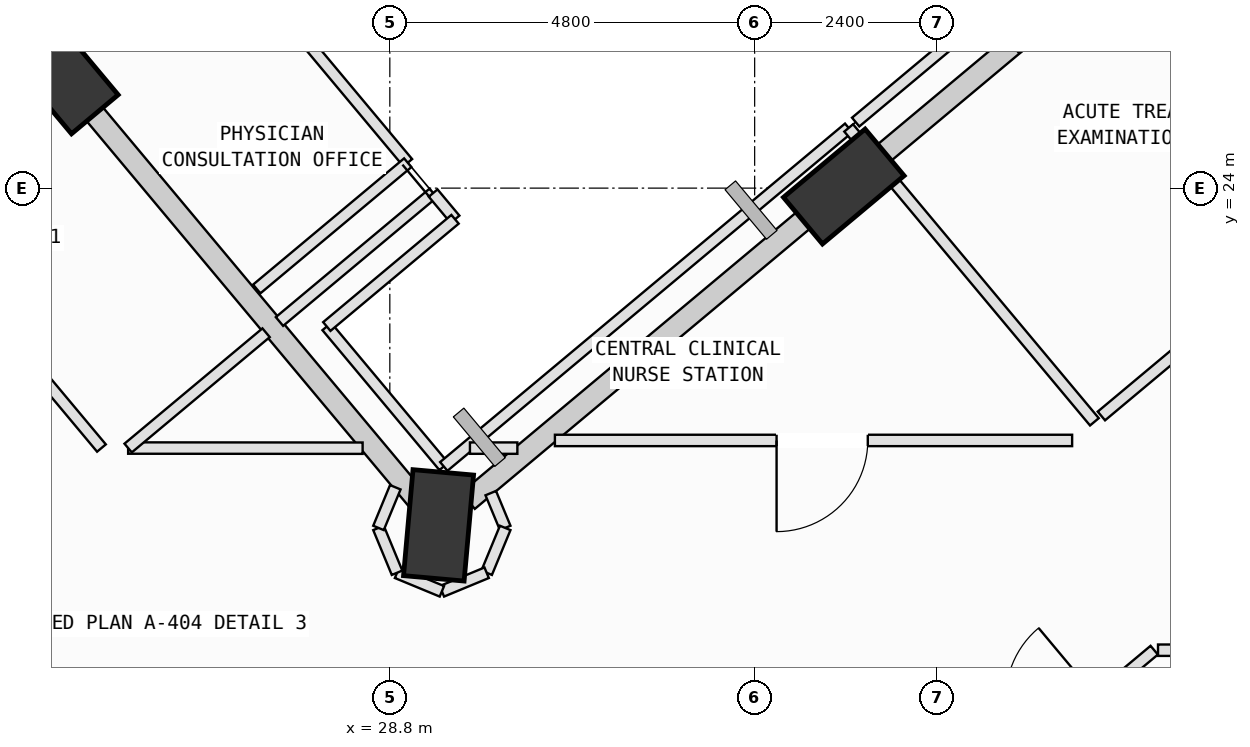
"""IFC4 building model, lengths in metres.
Left out: names, types, materials, properties, quantities, classifications, styles, units other than length and angle.
Written with IfcOpenShell. Run it as: python <this file> out.ifc"""

import sys

from ifc_helpers import new_model, si_unit, direction, frame, frame_2d, origin, origin_2d, place, context, subcontext, project, spatial, rectangle, extrude, element, fill, save


model = new_model("IFC4")
c1 = context("Model", 3, precision=1e-05, world=origin(), true_north=direction((0.0, 1.0)))
c2 = subcontext(c1, "Body", "Model", "MODEL_VIEW")
j1 = project(units=[si_unit("LENGTHUNIT", "METRE"), si_unit("PLANEANGLEUNIT", "RADIAN")], contexts=[c1])
p1 = place(None, origin())
s1 = spatial("IfcSite", under=j1, at=p1, CompositionType="ELEMENT")
p2 = place(p1, origin())
s2 = spatial("IfcBuilding", under=s1, at=p2, CompositionType="ELEMENT")
p3 = place(p2, frame((0.0, 0.0, 193.8)))
s3 = spatial("IfcBuildingStorey", under=s2, at=p3, CompositionType="ELEMENT", Elevation=193.8)
p4 = place(p3, frame((34.773, 24.021, 0.002), z_axis=(0.003176682547, 0.004887203919, 0.999983011819), x_axis=(-0.992801362115, -0.119714141473, 0.003738945699)))
e1 = element("IfcColumn", 1, at=p4, inside=s3, PredefinedType="COLUMN", context=c2, shape_type="SweptSolid", body=[
    extrude(rectangle(XDim=1.4, YDim=0.8, at=origin_2d()), origin(), (0.0, 0.0, 1.0), 3.996),
])
p5 = place(p3, frame((29.441, 19.563, 0.002), z_axis=(0.021801167922, -0.017037887535, 0.999617136441), x_axis=(-0.729765502986, 0.68314184463, 0.027559585755)))
e2 = element("IfcColumn", 2, at=p5, inside=s3, PredefinedType="COLUMN", context=c2, shape_type="SweptSolid", body=[
    extrude(rectangle(XDim=1.4, YDim=0.8, at=origin_2d()), origin(), (0.0, 0.0, 1.0), 3.998),
])
p6 = place(p3, frame((24.47, 25.508, 0.002), z_axis=(-0.00262502539, -0.037849203304, 0.999280014336), x_axis=(-0.586871563846, 0.809156714425, 0.029106340381)))
e3 = element("IfcColumn", 3, at=p6, inside=s3, PredefinedType="COLUMN", context=c2, shape_type="SweptSolid", body=[
    extrude(rectangle(XDim=1.4, YDim=0.8, at=origin_2d()), origin(), (0.0, 0.0, 1.0), 3.999),
])
p7 = place(p3, frame((35.162, 24.346, 0.0), z_axis=(0.0, 0.0, 1.0), x_axis=(0.767160218665, 0.641455531505, 0.0)))
e4 = element("IfcWall", 4, at=p7, inside=s3, PredefinedType="SOLIDWALL", context=c2, shape_type="SweptSolid", body=[
    extrude(rectangle(XDim=6.211, YDim=0.28, at=frame_2d((3.105, 0.0))), origin(), (0.0, 0.0, 1.0), 3.265),
])
p8 = place(p7, frame((2.388, 0.0, 0.75)))
e5 = element("IfcOpeningElement", 5, at=p8, cuts=e4, PredefinedType="OPENING", context=c2, shape_type="SweptSolid", body=[
    extrude(rectangle(XDim=1.8, YDim=2.05, at=frame_2d((0.9, 1.025))), frame((0.0, 0.15, 0.0), z_axis=(0.0, -1.0, 0.0), x_axis=(1.0, 0.0, 0.0)), (0.0, 0.0, 1.0), 0.3),
])
p9 = place(p3, frame((29.828, 19.887, 0.0), z_axis=(0.0, 0.0, 1.0), x_axis=(0.767165929265, 0.641448701749, 0.0)))
e6 = element("IfcWall", 6, at=p9, inside=s3, PredefinedType="SOLIDWALL", context=c2, shape_type="SweptSolid", body=[
    extrude(rectangle(XDim=5.96, YDim=0.28, at=frame_2d((2.98, 0.0))), origin(), (0.0, 0.0, 1.0), 3.265),
])
p10 = place(p3, frame((29.158, 19.902, 0.0), z_axis=(0.0, 0.0, 1.0), x_axis=(-0.641469423173, 0.767148603032, 0.0)))
e7 = element("IfcWall", 7, at=p10, inside=s3, PredefinedType="SOLIDWALL", context=c2, shape_type="SweptSolid", body=[
    extrude(rectangle(XDim=6.76, YDim=0.28, at=frame_2d((3.38, 0.0))), origin(), (0.0, 0.0, 1.0), 3.265),
])
p11 = place(p3, frame((35.725, 15.302, 0.0), z_axis=(0.0, 0.0, 1.0), x_axis=(0.767249700724, 0.641348498664, 0.0)))
e8 = element("IfcWall", 8, at=p11, inside=s3, PredefinedType="PARTITIONING", context=c2, shape_type="SweptSolid", body=[
    extrude(rectangle(XDim=4.082, YDim=0.15, at=frame_2d((2.041, 0.0))), origin(), (0.0, 0.0, 1.0), 3.78),
])
p12 = place(p11, frame((1.902, 0.0, 0.0)))
e9 = element("IfcOpeningElement", 9, at=p12, cuts=e8, PredefinedType="OPENING", context=c2, shape_type="SweptSolid", body=[
    extrude(rectangle(XDim=1.2, YDim=2.15, at=frame_2d((0.6, 1.075))), frame((0.0, 0.085, 0.0), z_axis=(0.0, -1.0, 0.0), x_axis=(1.0, 0.0, 0.0)), (0.0, 0.0, 1.0), 0.17),
])
p13 = place(p3, frame((38.907, 17.92, 0.0), z_axis=(0.0, 0.0, 1.0), x_axis=(1.0, 0.0, 0.0)))
e10 = element("IfcWall", 10, at=p13, inside=s3, PredefinedType="PARTITIONING", context=c2, shape_type="SweptSolid", body=[
    extrude(rectangle(XDim=2.283, YDim=0.15, at=frame_2d((1.142, 0.0))), origin(), (0.0, 0.0, 1.0), 3.065),
])
p14 = place(p3, frame((27.971, 22.179, 0.0), z_axis=(0.0, 0.0, 1.0), x_axis=(0.641374499126, -0.767227966038, 0.0)))
e11 = element("IfcWall", 11, at=p14, inside=s3, PredefinedType="PARTITIONING", context=c2, shape_type="SweptSolid", body=[
    extrude(rectangle(XDim=2.4, YDim=0.15, at=frame_2d((1.2, 0.0))), origin(), (0.0, 0.0, 1.0), 3.78),
])
p15 = place(p3, frame((29.51, 20.338, 0.0), z_axis=(0.0, 0.0, 1.0), x_axis=(0.767156772748, 0.641459652688, 0.0)))
e12 = element("IfcWall", 12, at=p15, inside=s3, PredefinedType="PARTITIONING", context=c2, shape_type="SweptSolid", body=[
    extrude(rectangle(XDim=6.944, YDim=0.15, at=frame_2d((3.472, 0.0))), origin(), (0.0, 0.0, 1.0), 3.78),
])
p16 = place(p3, frame((34.837, 24.792, 0.0), z_axis=(0.0, 0.0, 1.0), x_axis=(0.641177039374, -0.767392992006, 0.0)))
e13 = element("IfcWall", 13, at=p16, inside=s3, PredefinedType="PARTITIONING", context=c2, shape_type="SweptSolid", body=[
    extrude(rectangle(XDim=0.435, YDim=0.15, at=frame_2d((0.218, 0.0))), origin(), (0.0, 0.0, 1.0), 3.78),
])
p17 = place(p3, frame((35.264, 24.282, 0.0), z_axis=(0.0, 0.0, 1.0), x_axis=(0.641358182852, -0.767241605552, 0.0)))
e14 = element("IfcWall", 14, at=p17, inside=s3, PredefinedType="PARTITIONING", context=c2, shape_type="SweptSolid", body=[
    extrude(rectangle(XDim=4.375, YDim=0.15, at=frame_2d((2.188, 0.0))), origin(), (0.0, 0.0, 1.0), 3.78),
])
p18 = place(p3, frame((37.777, 20.68, 0.0), z_axis=(0.0, 0.0, 1.0), x_axis=(-1.0, 0.0, 0.0)))
e15 = element("IfcWall", 15, at=p18, inside=s3, PredefinedType="PARTITIONING", context=c2, shape_type="SweptSolid", body=[
    extrude(rectangle(XDim=6.805, YDim=0.15, at=frame_2d((3.403, 0.0))), origin(), (0.0, 0.0, 1.0), 3.78),
])
p19 = place(p18, frame((2.688, 0.0, 0.0)))
e16 = element("IfcOpeningElement", 16, at=p19, cuts=e15, PredefinedType="OPENING", context=c2, shape_type="SweptSolid", body=[
    extrude(rectangle(XDim=1.2, YDim=2.15, at=frame_2d((0.6, 1.075))), frame((0.0, 0.085, 0.0), z_axis=(0.0, -1.0, 0.0), x_axis=(1.0, 0.0, 0.0)), (0.0, 0.0, 1.0), 0.17),
])
p20 = place(p3, frame((30.478, 20.579, 0.0), z_axis=(0.0, 0.0, 1.0), x_axis=(-1.0, 0.0, 0.0)))
e17 = element("IfcWall", 17, at=p20, inside=s3, PredefinedType="PARTITIONING", context=c2, shape_type="SweptSolid", body=[
    extrude(rectangle(XDim=0.624, YDim=0.15, at=frame_2d((0.312, 0.0))), origin(), (0.0, 0.0, 1.0), 3.78),
])
p21 = place(p3, frame((30.128, 19.987, 0.0), z_axis=(0.0, 0.0, 1.0), x_axis=(0.383496518517, -0.92354232187, 0.0)))
e18 = element("IfcWall", 18, at=p21, inside=s3, PredefinedType="PARTITIONING", context=c2, shape_type="SweptSolid", body=[
    extrude(rectangle(XDim=0.496, YDim=0.15, at=frame_2d((0.248, 0.0))), origin(), (0.0, 0.0, 1.0), 3.78),
])
p22 = place(p3, frame((30.318, 19.529, 0.0), z_axis=(0.0, 0.0, 1.0), x_axis=(-0.382306769343, -0.924035461503, 0.0)))
e19 = element("IfcWall", 19, at=p22, inside=s3, PredefinedType="PARTITIONING", context=c2, shape_type="SweptSolid", body=[
    extrude(rectangle(XDim=0.639, YDim=0.15, at=frame_2d((0.319, 0.0))), origin(), (0.0, 0.0, 1.0), 3.78),
])
p23 = place(p3, frame((30.074, 18.939, 0.0), z_axis=(0.0, 0.0, 1.0), x_axis=(-0.923890787601, -0.382656259044, 0.0)))
e20 = element("IfcWall", 20, at=p23, inside=s3, PredefinedType="PARTITIONING", context=c2, shape_type="SweptSolid", body=[
    extrude(rectangle(XDim=0.637, YDim=0.15, at=frame_2d((0.319, 0.0))), origin(), (0.0, 0.0, 1.0), 3.78),
])
p24 = place(p3, frame((29.485, 18.695, 0.0), z_axis=(0.0, 0.0, 1.0), x_axis=(-0.924170479167, 0.381980268386, 0.0)))
e21 = element("IfcWall", 21, at=p24, inside=s3, PredefinedType="PARTITIONING", context=c2, shape_type="SweptSolid", body=[
    extrude(rectangle(XDim=0.638, YDim=0.15, at=frame_2d((0.319, 0.0))), origin(), (0.0, 0.0, 1.0), 3.78),
])
p25 = place(p3, frame((28.895, 18.939, 0.0), z_axis=(0.0, 0.0, 1.0), x_axis=(-0.382306769343, 0.924035461503, 0.0)))
e22 = element("IfcWall", 22, at=p25, inside=s3, PredefinedType="PARTITIONING", context=c2, shape_type="SweptSolid", body=[
    extrude(rectangle(XDim=0.639, YDim=0.15, at=frame_2d((0.319, 0.0))), origin(), (0.0, 0.0, 1.0), 3.78),
])
p26 = place(p3, frame((28.651, 19.529, 0.0), z_axis=(0.0, 0.0, 1.0), x_axis=(0.382128262134, 0.924109296176, 0.0)))
e23 = element("IfcWall", 23, at=p26, inside=s3, PredefinedType="PARTITIONING", context=c2, shape_type="SweptSolid", body=[
    extrude(rectangle(XDim=0.579, YDim=0.15, at=frame_2d((0.29, 0.0))), origin(), (0.0, 0.0, 1.0), 3.78),
])
p27 = place(p3, frame((28.442, 20.578, 0.0), z_axis=(0.0, 0.0, 1.0), x_axis=(-0.99999974635, 0.000712250532, 0.0)))
e24 = element("IfcWall", 24, at=p27, inside=s3, PredefinedType="PARTITIONING", context=c2, shape_type="SweptSolid", body=[
    extrude(rectangle(XDim=3.085, YDim=0.15, at=frame_2d((1.542, 0.0))), origin(), (0.0, 0.0, 1.0), 3.78),
])
p28 = place(p3, frame((25.357, 20.58, 0.0), z_axis=(0.0, 0.0, 1.0), x_axis=(0.767349224347, 0.641229419081, 0.0)))
e25 = element("IfcWall", 25, at=p28, inside=s3, PredefinedType="PARTITIONING", context=c2, shape_type="SweptSolid", body=[
    extrude(rectangle(XDim=2.365, YDim=0.15, at=frame_2d((1.183, 0.0))), origin(), (0.0, 0.0, 1.0), 3.78),
])
p29 = place(p3, frame((27.348, 22.245, 0.0), z_axis=(0.0, 0.0, 1.0), x_axis=(0.76733211285, 0.641249895587, 0.0)))
e26 = element("IfcWall", 26, at=p29, inside=s3, PredefinedType="PARTITIONING", context=c2, shape_type="SweptSolid", body=[
    extrude(rectangle(XDim=2.635, YDim=0.15, at=frame_2d((1.318, 0.0))), origin(), (0.0, 0.0, 1.0), 3.78),
])
p30 = place(p3, frame((29.37, 23.935, 0.0), z_axis=(0.0, 0.0, 1.0), x_axis=(0.640665314314, -0.767820262193, 0.0)))
e27 = element("IfcWall", 27, at=p30, inside=s3, PredefinedType="PARTITIONING", context=c2, shape_type="SweptSolid", body=[
    extrude(rectangle(XDim=0.449, YDim=0.15, at=frame_2d((0.225, 0.0))), origin(), (0.0, 0.0, 1.0), 3.78),
])
p31 = place(p3, frame((29.658, 23.59, 0.0), z_axis=(0.0, 0.0, 1.0), x_axis=(-0.767037139596, -0.641602701428, 0.0)))
e28 = element("IfcWall", 28, at=p31, inside=s3, PredefinedType="PARTITIONING", context=c2, shape_type="SweptSolid", body=[
    extrude(rectangle(XDim=2.199, YDim=0.15, at=frame_2d((1.1, 0.0))), origin(), (0.0, 0.0, 1.0), 3.78),
])
p32 = place(p3, frame((46.469, 27.948, 0.0), z_axis=(0.0, 0.0, 1.0), x_axis=(-0.767146465677, -0.641471979279, 0.0)))
e29 = element("IfcWall", 29, at=p32, inside=s3, PredefinedType="PARTITIONING", context=c2, shape_type="SweptSolid", body=[
    extrude(rectangle(XDim=10.828, YDim=0.15, at=frame_2d((5.414, 0.0))), origin(), (0.0, 0.0, 1.0), 3.065),
])
p33 = place(p32, frame((4.814, 0.0, 0.0)))
e30 = element("IfcOpeningElement", 30, at=p33, cuts=e29, PredefinedType="OPENING", context=c2, shape_type="SweptSolid", body=[
    extrude(rectangle(XDim=1.2, YDim=2.15, at=frame_2d((0.6, 1.075))), frame((0.0, 0.085, 0.0), z_axis=(0.0, -1.0, 0.0), x_axis=(1.0, 0.0, 0.0)), (0.0, 0.0, 1.0), 0.17),
])
p34 = place(p3, frame((34.929, 24.869, 0.0), z_axis=(0.0, 0.0, 1.0), x_axis=(0.767200123668, 0.641407803385, 0.0)))
e31 = element("IfcWall", 31, at=p34, inside=s3, PredefinedType="PARTITIONING", context=c2, shape_type="SweptSolid", body=[
    extrude(rectangle(XDim=10.828, YDim=0.15, at=frame_2d((5.414, 0.0))), origin(), (0.0, 0.0, 1.0), 3.265),
])
p35 = place(p3, frame((25.006, 20.58, 0.0), z_axis=(0.0, 0.0, 1.0), x_axis=(-0.641458710036, 0.767157560948, 0.0)))
e32 = element("IfcWall", 32, at=p35, inside=s3, PredefinedType="PARTITIONING", context=c2, shape_type="SweptSolid", body=[
    extrude(rectangle(XDim=4.764, YDim=0.15, at=frame_2d((2.382, 0.0))), origin(), (0.0, 0.0, 1.0), 3.415),
])
p36 = place(p35, frame((1.882, 0.0, 0.0)))
e33 = element("IfcOpeningElement", 33, at=p36, cuts=e32, PredefinedType="OPENING", context=c2, shape_type="SweptSolid", body=[
    extrude(rectangle(XDim=1.0, YDim=2.12, at=frame_2d((0.5, 1.06))), frame((0.0, 0.085, 0.0), z_axis=(0.0, -1.0, 0.0), x_axis=(1.0, 0.0, 0.0)), (0.0, 0.0, 1.0), 0.17),
])
p37 = place(p3, frame((25.04, 29.114, 0.0), z_axis=(0.0, 0.0, 1.0), x_axis=(0.641366946807, -0.767234279437, 0.0)))
e34 = element("IfcWall", 34, at=p37, inside=s3, PredefinedType="PARTITIONING", context=c2, shape_type="SweptSolid", body=[
    extrude(rectangle(XDim=6.23, YDim=0.15, at=frame_2d((3.115, 0.0))), origin(), (0.0, 0.0, 1.0), 3.78),
])
p38 = place(p3, frame((29.036, 24.334, 0.0), z_axis=(0.0, 0.0, 1.0), x_axis=(-0.767231220432, -0.641370606119, 0.0)))
e35 = element("IfcWall", 35, at=p38, inside=s3, PredefinedType="PARTITIONING", context=c2, shape_type="SweptSolid", body=[
    extrude(rectangle(XDim=2.59, YDim=0.15, at=frame_2d((1.295, 0.0))), origin(), (0.0, 0.0, 1.0), 3.78),
])
p39 = place(p19, origin())
e36 = element("IfcDoor", 36, at=p39, inside=s3, OperationType="SINGLE_SWING_RIGHT", PredefinedType="DOOR", context=c2, shape_type="SweptSolid", body=[
    extrude(rectangle(XDim=1.2, YDim=2.15, at=frame_2d((0.6, 1.075))), frame((0.0, 0.025, 0.0), z_axis=(0.0, -1.0, 0.0), x_axis=(1.0, 0.0, 0.0)), (0.0, 0.0, 1.0), 0.05),
])
fill(e16, e36)
save(model, sys.argv[1])
